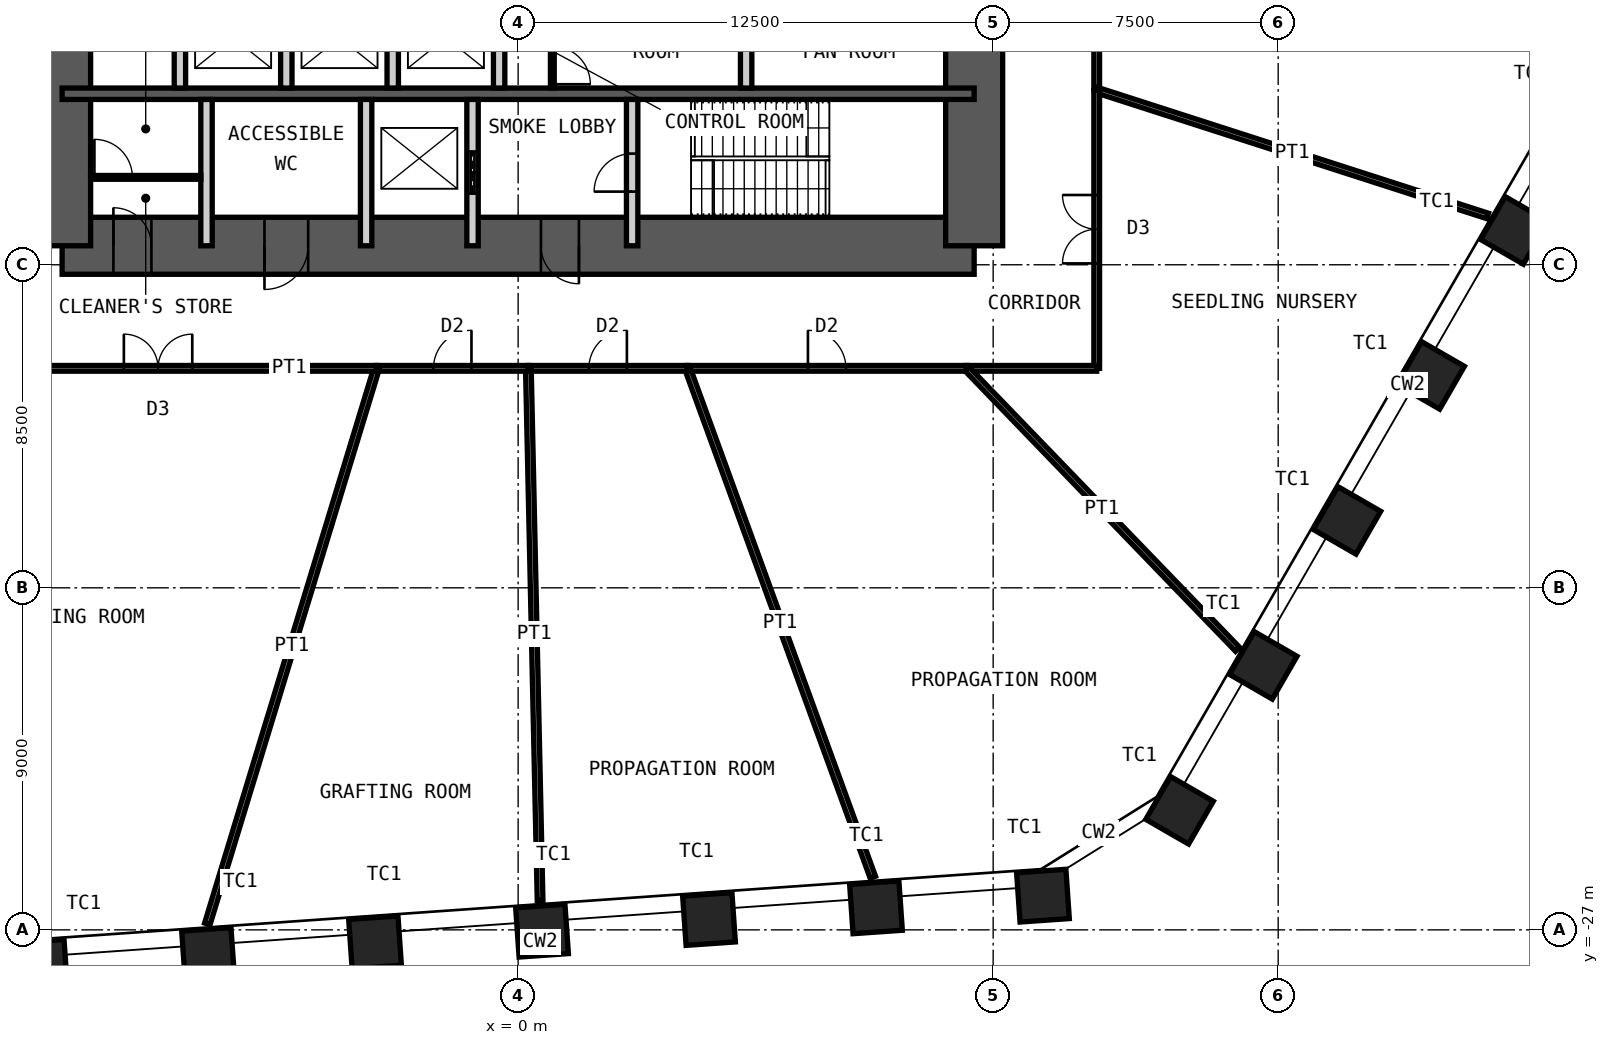
"""IFC4 building model, lengths in metres.
Left out: names, types, materials, properties, quantities, classifications, styles, units other than length and angle.
Written with IfcOpenShell. Run it as: python <this file> out.ifc"""

import sys

from ifc_helpers import new_model, si_unit, direction, frame, frame_2d, origin, origin_2d, place, context, subcontext, project, spatial, rectangle, hollow_rectangle, extrude, element, fill, save


model = new_model("IFC4")
c1 = context("Model", 3, precision=1e-05, world=origin(), true_north=direction((0.0, 1.0)))
c2 = subcontext(c1, "Body", "Model", "MODEL_VIEW")
j1 = project(units=[si_unit("LENGTHUNIT", "METRE"), si_unit("PLANEANGLEUNIT", "RADIAN")], contexts=[c1])
p1 = place(None, origin())
s1 = spatial("IfcSite", under=j1, at=p1, CompositionType="ELEMENT")
p2 = place(p1, origin())
s2 = spatial("IfcBuilding", under=s1, at=p2, CompositionType="ELEMENT")
p3 = place(p2, frame((0.0, 0.0, 27.0)))
s3 = spatial("IfcBuildingStorey", under=s2, at=p3, CompositionType="ELEMENT", Elevation=27.0)
for number, where, z_axis, x_axis in (
    (1, (26.214, -8.596, 0.0), (0.0, 0.0, 1.0), (0.5, 0.866, 0.0)),
    (2, (24.011, -12.411, 0.0), (0.0, 0.0, 1.0), (0.5, 0.866, 0.0)),
    (3, (21.809, -16.225, 0.0), (0.0, 0.0, 1.0), (0.5, 0.866, 0.0)),
    (4, (19.607, -20.04, 0.0), (0.0, 0.0, 1.0), (0.5, 0.866, 0.0)),
    (5, (17.405, -23.854, 0.0), (0.0, 0.0, 1.0), (0.5, 0.866, 0.0)),
    (6, (13.811, -26.1, 0.0), (0.0, 0.0, 1.0), (0.998, 0.07, 0.0)),
    (7, (9.417, -26.407, 0.0), (0.0, 0.0, 1.0), (0.998, 0.07, 0.0)),
    (8, (5.023, -26.715, 0.0), (0.0, 0.0, 1.0), (0.998, 0.07, 0.0)),
    (9, (0.629, -27.022, 0.0), (0.0, 0.0, 1.0), (0.998, 0.07, 0.0)),
    (10, (-3.765, -27.329, 0.0), (0.0, 0.0, 1.0), (0.998, 0.07, 0.0)),
    (11, (-8.159, -27.636, 0.0), (0.0, 0.0, 1.0), (0.998, 0.07, 0.0)),
    (12, (-12.553, -27.944, 0.0), (0.0, 0.0, 1.0), (0.998, 0.07, 0.0)),
):
    element("IfcColumn", number, at=place(p3, frame(where, z_axis=z_axis, x_axis=x_axis)), inside=s3, PredefinedType="COLUMN", context=c2, shape_type="SweptSolid", body=[
        extrude(hollow_rectangle(XDim=1.3, YDim=1.3, WallThickness=0.1, at=origin_2d()), origin(), (0.0, 0.0, 1.0), 5.0),
    ])
p4 = place(p3, frame((-12.0, -9.0, 0.0), z_axis=(0.0, 0.0, 1.0), x_axis=(1.0, 0.0, 0.0)))
e13 = element("IfcWall", 13, at=p4, inside=s3, PredefinedType="SHEAR", context=c2, shape_type="SweptSolid", body=[
    extrude(rectangle(XDim=24.0, YDim=1.5, at=frame_2d((12.0, 0.0))), origin(), (0.0, 0.0, 1.0), 5.0),
])
p5 = place(p4, frame((1.35, 0.0, 0.0)))
e14 = element("IfcOpeningElement", 14, at=p5, cuts=e13, PredefinedType="OPENING", context=c2, shape_type="SweptSolid", body=[
    extrude(rectangle(XDim=1.0, YDim=2.1, at=frame_2d((0.5, 1.05))), frame((0.0, 0.76, 0.0), z_axis=(0.0, -1.0, 0.0), x_axis=(1.0, 0.0, 0.0)), (0.0, 0.0, 1.0), 1.52),
])
p6 = place(p4, frame((5.325, 0.0, 0.0)))
e15 = element("IfcOpeningElement", 15, at=p6, cuts=e13, PredefinedType="OPENING", context=c2, shape_type="SweptSolid", body=[
    extrude(rectangle(XDim=1.15, YDim=2.1, at=frame_2d((0.575, 1.05))), frame((0.0, 0.76, 0.0), z_axis=(0.0, -1.0, 0.0), x_axis=(1.0, 0.0, 0.0)), (0.0, 0.0, 1.0), 1.52),
])
p7 = place(p4, frame((12.6, 0.0, 0.0)))
e16 = element("IfcOpeningElement", 16, at=p7, cuts=e13, PredefinedType="OPENING", context=c2, shape_type="SweptSolid", body=[
    extrude(rectangle(XDim=1.0, YDim=2.1, at=frame_2d((0.5, 1.05))), frame((0.0, 0.76, 0.0), z_axis=(0.0, -1.0, 0.0), x_axis=(1.0, 0.0, 0.0)), (0.0, 0.0, 1.0), 1.52),
])
p8 = place(p3, frame((12.0, -9.0, 0.0), z_axis=(0.0, 0.0, 1.0), x_axis=(0.0, 1.0, 0.0)))
e17 = element("IfcWall", 17, at=p8, inside=s3, PredefinedType="SHEAR", context=c2, shape_type="SweptSolid", body=[
    extrude(rectangle(XDim=18.0, YDim=1.5, at=frame_2d((9.0, 0.0))), origin(), (0.0, 0.0, 1.0), 5.0),
])
p9 = place(p8, frame((8.1, 0.0, 0.0)))
e18 = element("IfcOpeningElement", 18, at=p9, cuts=e17, PredefinedType="OPENING", context=c2, shape_type="SweptSolid", body=[
    extrude(rectangle(XDim=1.8, YDim=2.1, at=frame_2d((0.9, 1.05))), frame((0.0, 0.76, 0.0), z_axis=(0.0, -1.0, 0.0), x_axis=(1.0, 0.0, 0.0)), (0.0, 0.0, 1.0), 1.52),
])
p10 = place(p3, frame((-12.0, -9.0, 0.0), z_axis=(0.0, 0.0, 1.0), x_axis=(0.0, 1.0, 0.0)))
e19 = element("IfcWall", 19, at=p10, inside=s3, PredefinedType="SHEAR", context=c2, shape_type="SweptSolid", body=[
    extrude(rectangle(XDim=18.0, YDim=1.5, at=frame_2d((9.0, 0.0))), origin(), (0.0, 0.0, 1.0), 5.0),
])
p11 = place(p10, frame((8.1, 0.0, 0.0)))
e20 = element("IfcOpeningElement", 20, at=p11, cuts=e19, PredefinedType="OPENING", context=c2, shape_type="SweptSolid", body=[
    extrude(rectangle(XDim=1.8, YDim=2.1, at=frame_2d((0.9, 1.05))), frame((0.0, 0.76, 0.0), z_axis=(0.0, -1.0, 0.0), x_axis=(1.0, 0.0, 0.0)), (0.0, 0.0, 1.0), 1.52),
])
p12 = place(p3, frame((-12.0, -5.0, 0.0), z_axis=(0.0, 0.0, 1.0), x_axis=(1.0, 0.0, 0.0)))
e21 = element("IfcWall", 21, at=p12, inside=s3, PredefinedType="SHEAR", context=c2, shape_type="SweptSolid", body=[
    extrude(rectangle(XDim=24.0, YDim=0.3, at=frame_2d((12.0, 0.0))), origin(), (0.0, 0.0, 1.0), 5.0),
])
for number, where, z_axis, x_axis in (
    (22, (-8.9, -4.85, 0.0), (0.0, 0.0, 1.0), (0.0, 1.0, 0.0)),
    (23, (-6.1, -4.85, 0.0), (0.0, 0.0, 1.0), (0.0, 1.0, 0.0)),
    (24, (-3.3, -4.85, 0.0), (0.0, 0.0, 1.0), (0.0, 1.0, 0.0)),
    (25, (-0.5, -4.85, 0.0), (0.0, 0.0, 1.0), (0.0, 1.0, 0.0)),
    (26, (6.0, -4.85, 0.0), (0.0, 0.0, 1.0), (0.0, 1.0, 0.0)),
):
    element("IfcWall", number, at=place(p3, frame(where, z_axis=z_axis, x_axis=x_axis)), inside=s3, PredefinedType="PARTITIONING", context=c2, shape_type="SweptSolid", body=[
        extrude(rectangle(XDim=2.65, YDim=0.3, at=frame_2d((1.325, 0.0))), origin(), (0.0, 0.0, 1.0), 4.78),
    ])
for number, where, z_axis, x_axis in (
    (27, (-8.2, -9.0, 0.0), (0.0, 0.0, 1.0), (0.0, 1.0, 0.0)),
    (28, (-4.0, -9.0, 0.0), (0.0, 0.0, 1.0), (0.0, 1.0, 0.0)),
):
    element("IfcWall", number, at=place(p3, frame(where, z_axis=z_axis, x_axis=x_axis)), inside=s3, PredefinedType="PARTITIONING", context=c2, shape_type="SweptSolid", body=[
        extrude(rectangle(XDim=3.85, YDim=0.3, at=frame_2d((1.925, 0.0))), origin(), (0.0, 0.0, 1.0), 4.78),
    ])
p13 = place(p3, frame((-1.2, -9.0, 0.0), z_axis=(0.0, 0.0, 1.0), x_axis=(0.0, 1.0, 0.0)))
e29 = element("IfcWall", 29, at=p13, inside=s3, PredefinedType="PARTITIONING", context=c2, shape_type="SweptSolid", body=[
    extrude(rectangle(XDim=3.85, YDim=0.3, at=frame_2d((1.925, 0.0))), origin(), (0.0, 0.0, 1.0), 4.78),
])
p14 = place(p13, frame((1.375, 0.0, 0.0)))
e30 = element("IfcOpeningElement", 30, at=p14, cuts=e29, PredefinedType="OPENING", context=c2, shape_type="SweptSolid", body=[
    extrude(rectangle(XDim=1.1, YDim=2.4, at=frame_2d((0.55, 1.2))), frame((0.0, 0.16, 0.0), z_axis=(0.0, -1.0, 0.0), x_axis=(1.0, 0.0, 0.0)), (0.0, 0.0, 1.0), 0.32),
])
p15 = place(p3, frame((3.0, -9.0, 0.0), z_axis=(0.0, 0.0, 1.0), x_axis=(0.0, 1.0, 0.0)))
e31 = element("IfcWall", 31, at=p15, inside=s3, PredefinedType="PARTITIONING", context=c2, shape_type="SweptSolid", body=[
    extrude(rectangle(XDim=3.85, YDim=0.3, at=frame_2d((1.925, 0.0))), origin(), (0.0, 0.0, 1.0), 4.78),
])
p16 = place(p15, frame((1.425, 0.0, 0.0)))
e32 = element("IfcOpeningElement", 32, at=p16, cuts=e31, PredefinedType="OPENING", context=c2, shape_type="SweptSolid", body=[
    extrude(rectangle(XDim=1.0, YDim=2.1, at=frame_2d((0.5, 1.05))), frame((0.0, 0.16, 0.0), z_axis=(0.0, -1.0, 0.0), x_axis=(1.0, 0.0, 0.0)), (0.0, 0.0, 1.0), 0.32),
])
p17 = place(p3, frame((0.9, -4.85, 0.0), z_axis=(0.0, 0.0, 1.0), x_axis=(0.0, 1.0, 0.0)))
e33 = element("IfcWall", 33, at=p17, inside=s3, PredefinedType="PARTITIONING", context=c2, shape_type="SweptSolid", body=[
    extrude(rectangle(XDim=2.65, YDim=0.1, at=frame_2d((1.325, 0.0))), origin(), (0.0, 0.0, 1.0), 4.78),
])
p18 = place(p17, frame((0.1, 0.0, 0.0)))
e34 = element("IfcOpeningElement", 34, at=p18, cuts=e33, PredefinedType="OPENING", context=c2, shape_type="SweptSolid", body=[
    extrude(rectangle(XDim=1.0, YDim=2.4, at=frame_2d((0.5, 1.2))), frame((0.0, 0.06, 0.0), z_axis=(0.0, -1.0, 0.0), x_axis=(1.0, 0.0, 0.0)), (0.0, 0.0, 1.0), 0.12),
])
p19 = place(p3, frame((-11.25, -7.2, 0.0), z_axis=(0.0, 0.0, 1.0), x_axis=(1.0, 0.0, 0.0)))
e35 = element("IfcWall", 35, at=p19, inside=s3, PredefinedType="PARTITIONING", context=c2, shape_type="SweptSolid", body=[
    extrude(rectangle(XDim=2.9, YDim=0.1, at=frame_2d((1.45, 0.0))), origin(), (0.0, 0.0, 1.0), 4.78),
])
p20 = place(p19, frame((0.1, 0.0, 0.0)))
e36 = element("IfcOpeningElement", 36, at=p20, cuts=e35, PredefinedType="OPENING", context=c2, shape_type="SweptSolid", body=[
    extrude(rectangle(XDim=1.0, YDim=2.4, at=frame_2d((0.5, 1.2))), frame((0.0, 0.06, 0.0), z_axis=(0.0, -1.0, 0.0), x_axis=(1.0, 0.0, 0.0)), (0.0, 0.0, 1.0), 0.12),
])
p21 = place(p3, frame((15.225, 3.53, 0.0), z_axis=(0.0, 0.0, 1.0), x_axis=(0.0, -1.0, 0.0)))
e37 = element("IfcWall", 37, at=p21, inside=s3, PredefinedType="PARTITIONING", context=c2, shape_type="SweptSolid", body=[
    extrude(rectangle(XDim=8.433, YDim=0.15, at=frame_2d((4.217, 0.0))), origin(), (0.0, 0.0, 1.0), 4.8),
])
p22 = place(p21, frame((3.317, 0.0, 0.0)))
e38 = element("IfcOpeningElement", 38, at=p22, cuts=e37, PredefinedType="OPENING", context=c2, shape_type="SweptSolid", body=[
    extrude(rectangle(XDim=1.8, YDim=2.4, at=frame_2d((0.9, 1.2))), frame((0.0, 0.085, 0.0), z_axis=(0.0, -1.0, 0.0), x_axis=(1.0, 0.0, 0.0)), (0.0, 0.0, 1.0), 0.17),
])
p23 = place(p3, frame((25.512, -8.216, 0.0), z_axis=(0.0, 0.0, 1.0), x_axis=(-0.95186413264, 0.306520265225, 0.0)))
e39 = element("IfcWall", 39, at=p23, inside=s3, PredefinedType="PARTITIONING", context=c2, shape_type="SweptSolid", body=[
    extrude(rectangle(XDim=10.808, YDim=0.15, at=frame_2d((5.404, 0.0))), origin(), (0.0, 0.0, 1.0), 3.7),
])
p24 = place(p3, frame((15.225, -4.903, 0.0), z_axis=(0.0, 0.0, 1.0), x_axis=(0.0, -1.0, 0.0)))
e40 = element("IfcWall", 40, at=p24, inside=s3, PredefinedType="PARTITIONING", context=c2, shape_type="SweptSolid", body=[
    extrude(rectangle(XDim=7.322, YDim=0.15, at=frame_2d((3.661, 0.0))), origin(), (0.0, 0.0, 1.0), 4.8),
])
p25 = place(p24, frame((2.761, 0.0, 0.0)))
e41 = element("IfcOpeningElement", 41, at=p25, cuts=e40, PredefinedType="OPENING", context=c2, shape_type="SweptSolid", body=[
    extrude(rectangle(XDim=1.8, YDim=2.4, at=frame_2d((0.9, 1.2))), frame((0.0, 0.085, 0.0), z_axis=(0.0, -1.0, 0.0), x_axis=(1.0, 0.0, 0.0)), (0.0, 0.0, 1.0), 0.17),
])
p26 = place(p3, frame((15.225, -12.225, 0.0), z_axis=(0.0, 0.0, 1.0), x_axis=(-1.0, 0.0, 0.0)))
e42 = element("IfcWall", 42, at=p26, inside=s3, PredefinedType="PARTITIONING", context=c2, shape_type="SweptSolid", body=[
    extrude(rectangle(XDim=3.428, YDim=0.15, at=frame_2d((1.714, 0.0))), origin(), (0.0, 0.0, 1.0), 4.8),
])
p27 = place(p3, frame((18.931, -19.618, 0.0), z_axis=(0.0, 0.0, 1.0), x_axis=(-0.694399830455, 0.719589379761, 0.0)))
e43 = element("IfcWall", 43, at=p27, inside=s3, PredefinedType="PARTITIONING", context=c2, shape_type="SweptSolid", body=[
    extrude(rectangle(XDim=10.274, YDim=0.15, at=frame_2d((5.137, 0.0))), origin(), (0.0, 0.0, 1.0), 3.7),
])
p28 = place(p3, frame((11.797, -12.225, 0.0), z_axis=(0.0, 0.0, 1.0), x_axis=(-1.0, 0.0, 0.0)))
e44 = element("IfcWall", 44, at=p28, inside=s3, PredefinedType="PARTITIONING", context=c2, shape_type="SweptSolid", body=[
    extrude(rectangle(XDim=7.343, YDim=0.15, at=frame_2d((3.671, 0.0))), origin(), (0.0, 0.0, 1.0), 4.8),
])
p29 = place(p28, frame((3.171, 0.0, 0.0)))
e45 = element("IfcOpeningElement", 45, at=p29, cuts=e44, PredefinedType="OPENING", context=c2, shape_type="SweptSolid", body=[
    extrude(rectangle(XDim=1.0, YDim=2.4, at=frame_2d((0.5, 1.2))), frame((0.0, 0.085, 0.0), z_axis=(0.0, -1.0, 0.0), x_axis=(1.0, 0.0, 0.0)), (0.0, 0.0, 1.0), 0.17),
])
p30 = place(p3, frame((9.333, -25.615, 0.0), z_axis=(0.0, 0.0, 1.0), x_axis=(-0.342348208267, 0.939573150051, 0.0)))
e46 = element("IfcWall", 46, at=p30, inside=s3, PredefinedType="PARTITIONING", context=c2, shape_type="SweptSolid", body=[
    extrude(rectangle(XDim=14.251, YDim=0.15, at=frame_2d((7.125, 0.0))), origin(), (0.0, 0.0, 1.0), 3.7),
])
p31 = place(p3, frame((4.455, -12.225, 0.0), z_axis=(0.0, 0.0, 1.0), x_axis=(-1.0, 0.0, 0.0)))
e47 = element("IfcWall", 47, at=p31, inside=s3, PredefinedType="PARTITIONING", context=c2, shape_type="SweptSolid", body=[
    extrude(rectangle(XDim=4.185, YDim=0.15, at=frame_2d((2.093, 0.0))), origin(), (0.0, 0.0, 1.0), 4.8),
])
p32 = place(p31, frame((1.593, 0.0, 0.0)))
e48 = element("IfcOpeningElement", 48, at=p32, cuts=e47, PredefinedType="OPENING", context=c2, shape_type="SweptSolid", body=[
    extrude(rectangle(XDim=1.0, YDim=2.4, at=frame_2d((0.5, 1.2))), frame((0.0, 0.085, 0.0), z_axis=(0.0, -1.0, 0.0), x_axis=(1.0, 0.0, 0.0)), (0.0, 0.0, 1.0), 0.17),
])
p33 = place(p3, frame((0.578, -26.224, 0.0), z_axis=(0.0, 0.0, 1.0), x_axis=(-0.022039362711, 0.999757103746, 0.0)))
e49 = element("IfcWall", 49, at=p33, inside=s3, PredefinedType="PARTITIONING", context=c2, shape_type="SweptSolid", body=[
    extrude(rectangle(XDim=14.002, YDim=0.15, at=frame_2d((7.001, 0.0))), origin(), (0.0, 0.0, 1.0), 3.7),
])
p34 = place(p3, frame((0.269, -12.225, 0.0), z_axis=(0.0, 0.0, 1.0), x_axis=(-1.0, 0.0, 0.0)))
e50 = element("IfcWall", 50, at=p34, inside=s3, PredefinedType="PARTITIONING", context=c2, shape_type="SweptSolid", body=[
    extrude(rectangle(XDim=3.994, YDim=0.15, at=frame_2d((1.997, 0.0))), origin(), (0.0, 0.0, 1.0), 4.8),
])
p35 = place(p34, frame((1.497, 0.0, 0.0)))
e51 = element("IfcOpeningElement", 51, at=p35, cuts=e50, PredefinedType="OPENING", context=c2, shape_type="SweptSolid", body=[
    extrude(rectangle(XDim=1.0, YDim=2.4, at=frame_2d((0.5, 1.2))), frame((0.0, 0.085, 0.0), z_axis=(0.0, -1.0, 0.0), x_axis=(1.0, 0.0, 0.0)), (0.0, 0.0, 1.0), 0.17),
])
p36 = place(p3, frame((-8.179, -26.843, 0.0), z_axis=(0.0, 0.0, 1.0), x_axis=(0.291465492753, 0.956581343397, 0.0)))
e52 = element("IfcWall", 52, at=p36, inside=s3, PredefinedType="PARTITIONING", context=c2, shape_type="SweptSolid", body=[
    extrude(rectangle(XDim=15.281, YDim=0.15, at=frame_2d((7.641, 0.0))), origin(), (0.0, 0.0, 1.0), 3.7),
])
p37 = place(p3, frame((-3.725, -12.225, 0.0), z_axis=(0.0, 0.0, 1.0), x_axis=(-1.0, 0.0, 0.0)))
e53 = element("IfcWall", 53, at=p37, inside=s3, PredefinedType="PARTITIONING", context=c2, shape_type="SweptSolid", body=[
    extrude(rectangle(XDim=11.5, YDim=0.15, at=frame_2d((5.75, 0.0))), origin(), (0.0, 0.0, 1.0), 4.8),
])
p38 = place(p37, frame((4.85, 0.0, 0.0)))
e54 = element("IfcOpeningElement", 54, at=p38, cuts=e53, PredefinedType="OPENING", context=c2, shape_type="SweptSolid", body=[
    extrude(rectangle(XDim=1.8, YDim=2.4, at=frame_2d((0.9, 1.2))), frame((0.0, 0.085, 0.0), z_axis=(0.0, -1.0, 0.0), x_axis=(1.0, 0.0, 0.0)), (0.0, 0.0, 1.0), 0.17),
])
p39 = place(p5, origin())
e55 = element("IfcDoor", 55, at=p39, inside=s3, OperationType="SINGLE_SWING_RIGHT", PredefinedType="DOOR", context=c2, shape_type="SweptSolid", body=[
    extrude(rectangle(XDim=1.0, YDim=2.1, at=frame_2d((0.5, 1.05))), frame((0.0, 0.025, 0.0), z_axis=(0.0, -1.0, 0.0), x_axis=(1.0, 0.0, 0.0)), (0.0, 0.0, 1.0), 0.05),
])
fill(e14, e55)
p40 = place(p6, origin())
e56 = element("IfcDoor", 56, at=p40, inside=s3, OperationType="SINGLE_SWING_LEFT", PredefinedType="DOOR", context=c2, shape_type="SweptSolid", body=[
    extrude(rectangle(XDim=1.15, YDim=2.1, at=frame_2d((0.575, 1.05))), frame((0.0, 0.025, 0.0), z_axis=(0.0, -1.0, 0.0), x_axis=(1.0, 0.0, 0.0)), (0.0, 0.0, 1.0), 0.05),
])
fill(e15, e56)
p41 = place(p7, origin())
e57 = element("IfcDoor", 57, at=p41, inside=s3, OperationType="SINGLE_SWING_RIGHT", PredefinedType="DOOR", context=c2, shape_type="SweptSolid", body=[
    extrude(rectangle(XDim=1.0, YDim=2.1, at=frame_2d((0.5, 1.05))), frame((0.0, 0.025, 0.0), z_axis=(0.0, -1.0, 0.0), x_axis=(1.0, 0.0, 0.0)), (0.0, 0.0, 1.0), 0.05),
])
fill(e16, e57)
p42 = place(p16, origin())
e58 = element("IfcDoor", 58, at=p42, inside=s3, OperationType="SINGLE_SWING_RIGHT", PredefinedType="DOOR", context=c2, shape_type="SweptSolid", body=[
    extrude(rectangle(XDim=1.0, YDim=2.1, at=frame_2d((0.5, 1.05))), frame((0.0, 0.025, 0.0), z_axis=(0.0, -1.0, 0.0), x_axis=(1.0, 0.0, 0.0)), (0.0, 0.0, 1.0), 0.05),
])
fill(e32, e58)
p43 = place(p14, origin())
e59 = element("IfcDoor", 59, at=p43, inside=s3, OperationType="DOUBLE_DOOR_SLIDING", PredefinedType="DOOR", context=c2, shape_type="SweptSolid", body=[
    extrude(rectangle(XDim=1.1, YDim=2.4, at=frame_2d((0.55, 1.2))), frame((0.0, 0.025, 0.0), z_axis=(0.0, -1.0, 0.0), x_axis=(1.0, 0.0, 0.0)), (0.0, 0.0, 1.0), 0.05),
])
fill(e30, e59)
p44 = place(p18, origin())
e60 = element("IfcDoor", 60, at=p44, inside=s3, OperationType="SINGLE_SWING_LEFT", PredefinedType="DOOR", context=c2, shape_type="SweptSolid", body=[
    extrude(rectangle(XDim=1.0, YDim=2.4, at=frame_2d((0.5, 1.2))), frame((0.0, 0.025, 0.0), z_axis=(0.0, -1.0, 0.0), x_axis=(1.0, 0.0, 0.0)), (0.0, 0.0, 1.0), 0.05),
])
fill(e34, e60)
p45 = place(p20, origin())
e61 = element("IfcDoor", 61, at=p45, inside=s3, OperationType="SINGLE_SWING_RIGHT", PredefinedType="DOOR", context=c2, shape_type="SweptSolid", body=[
    extrude(rectangle(XDim=1.0, YDim=2.4, at=frame_2d((0.5, 1.2))), frame((0.0, 0.025, 0.0), z_axis=(0.0, -1.0, 0.0), x_axis=(1.0, 0.0, 0.0)), (0.0, 0.0, 1.0), 0.05),
])
fill(e36, e61)
p46 = place(p25, origin())
e62 = element("IfcDoor", 62, at=p46, inside=s3, OperationType="DOUBLE_DOOR_DOUBLE_SWING", PredefinedType="DOOR", context=c2, shape_type="SweptSolid", body=[
    extrude(rectangle(XDim=1.8, YDim=2.4, at=frame_2d((0.9, 1.2))), frame((0.0, 0.025, 0.0), z_axis=(0.0, -1.0, 0.0), x_axis=(1.0, 0.0, 0.0)), (0.0, 0.0, 1.0), 0.05),
])
fill(e41, e62)
p47 = place(p29, origin())
e63 = element("IfcDoor", 63, at=p47, inside=s3, OperationType="SINGLE_SWING_RIGHT", PredefinedType="DOOR", context=c2, shape_type="SweptSolid", body=[
    extrude(rectangle(XDim=1.0, YDim=2.4, at=frame_2d((0.5, 1.2))), frame((0.0, 0.025, 0.0), z_axis=(0.0, -1.0, 0.0), x_axis=(1.0, 0.0, 0.0)), (0.0, 0.0, 1.0), 0.05),
])
fill(e45, e63)
p48 = place(p32, origin())
e64 = element("IfcDoor", 64, at=p48, inside=s3, OperationType="SINGLE_SWING_LEFT", PredefinedType="DOOR", context=c2, shape_type="SweptSolid", body=[
    extrude(rectangle(XDim=1.0, YDim=2.4, at=frame_2d((0.5, 1.2))), frame((0.0, 0.025, 0.0), z_axis=(0.0, -1.0, 0.0), x_axis=(1.0, 0.0, 0.0)), (0.0, 0.0, 1.0), 0.05),
])
fill(e48, e64)
p49 = place(p35, origin())
e65 = element("IfcDoor", 65, at=p49, inside=s3, OperationType="SINGLE_SWING_LEFT", PredefinedType="DOOR", context=c2, shape_type="SweptSolid", body=[
    extrude(rectangle(XDim=1.0, YDim=2.4, at=frame_2d((0.5, 1.2))), frame((0.0, 0.025, 0.0), z_axis=(0.0, -1.0, 0.0), x_axis=(1.0, 0.0, 0.0)), (0.0, 0.0, 1.0), 0.05),
])
fill(e51, e65)
p50 = place(p38, origin())
e66 = element("IfcDoor", 66, at=p50, inside=s3, OperationType="DOUBLE_DOOR_DOUBLE_SWING", PredefinedType="DOOR", context=c2, shape_type="SweptSolid", body=[
    extrude(rectangle(XDim=1.8, YDim=2.4, at=frame_2d((0.9, 1.2))), frame((0.0, 0.025, 0.0), z_axis=(0.0, -1.0, 0.0), x_axis=(1.0, 0.0, 0.0)), (0.0, 0.0, 1.0), 0.05),
])
fill(e54, e66)
save(model, sys.argv[1])
